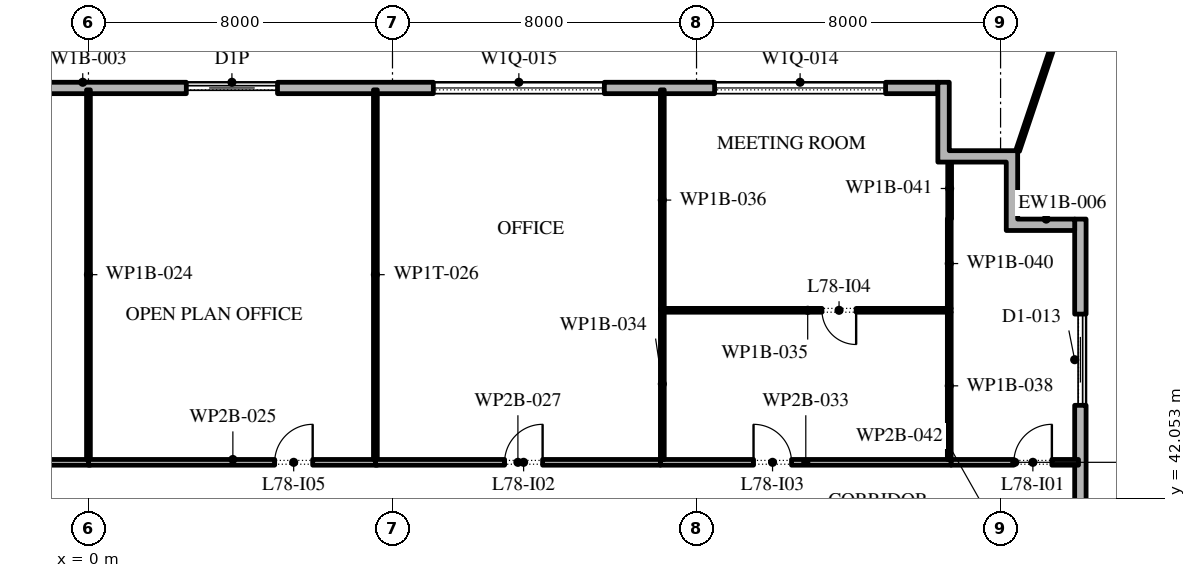
"""IFC4 building model, lengths in metres.
Left out: names, types, materials, properties, quantities, classifications, styles, units other than length and angle.
Written with IfcOpenShell. Run it as: python <this file> out.ifc"""

import sys

from ifc_helpers import new_model, si_unit, direction, frame, frame_2d, origin, place, context, subcontext, project, spatial, polyline, rectangle, outline, extrude, element, fill, save


model = new_model("IFC4")
c1 = context("Model", 3, precision=1e-05, world=origin(), true_north=direction((0.0, 1.0)))
c2 = subcontext(c1, "Body", "Model", "MODEL_VIEW")
j1 = project(units=[si_unit("LENGTHUNIT", "METRE"), si_unit("PLANEANGLEUNIT", "RADIAN")], contexts=[c1])
p1 = place(None, origin())
s1 = spatial("IfcSite", under=j1, at=p1, CompositionType="ELEMENT")
p2 = place(p1, origin())
s2 = spatial("IfcBuilding", under=s1, at=p2, CompositionType="ELEMENT")
p3 = place(p2, frame((0.0, 0.0, 355.2)))
s3 = spatial("IfcBuildingStorey", under=s2, at=p3, CompositionType="ELEMENT", Elevation=355.2)
p4 = place(p3, frame((26.1, -2.1, 0.0), z_axis=(0.0, 0.0, 1.0), x_axis=(0.0, 1.0, 0.0)))
e1 = element("IfcWall", 1, at=p4, inside=s3, PredefinedType="STANDARD", context=c2, shape_type="SweptSolid", body=[
    extrude(rectangle(XDim=51.5, YDim=0.3, at=frame_2d((25.75, 0.0))), origin(), (0.0, 0.0, 1.0), 3.95),
])
p5 = place(p4, frame((1.3, 0.0, 0.45)))
e2 = element("IfcOpeningElement", 2, at=p5, cuts=e1, PredefinedType="OPENING", context=c2, shape_type="SweptSolid", body=[
    extrude(rectangle(XDim=4.5, YDim=3.0, at=frame_2d((2.25, 1.5))), frame((0.0, 0.16, 0.0), z_axis=(0.0, -1.0, 0.0), x_axis=(1.0, 0.0, 0.0)), (0.0, 0.0, 1.0), 0.32),
])
p6 = place(p4, frame((8.55, 0.0, 0.45)))
e3 = element("IfcOpeningElement", 3, at=p6, cuts=e1, PredefinedType="OPENING", context=c2, shape_type="SweptSolid", body=[
    extrude(rectangle(XDim=4.5, YDim=3.0, at=frame_2d((2.25, 1.5))), frame((0.0, 0.16, 0.0), z_axis=(0.0, -1.0, 0.0), x_axis=(1.0, 0.0, 0.0)), (0.0, 0.0, 1.0), 0.32),
])
p7 = place(p4, frame((17.0, 0.0, 0.0)))
e4 = element("IfcOpeningElement", 4, at=p7, cuts=e1, PredefinedType="OPENING", context=c2, shape_type="SweptSolid", body=[
    extrude(rectangle(XDim=2.4, YDim=3.5, at=frame_2d((1.2, 1.75))), frame((0.0, 0.16, 0.0), z_axis=(0.0, -1.0, 0.0), x_axis=(1.0, 0.0, 0.0)), (0.0, 0.0, 1.0), 0.32),
])
p8 = place(p4, frame((23.35, 0.0, 0.45)))
e5 = element("IfcOpeningElement", 5, at=p8, cuts=e1, PredefinedType="OPENING", context=c2, shape_type="SweptSolid", body=[
    extrude(rectangle(XDim=4.5, YDim=3.05, at=frame_2d((2.25, 1.525))), frame((0.0, 0.16, 0.0), z_axis=(0.0, -1.0, 0.0), x_axis=(1.0, 0.0, 0.0)), (0.0, 0.0, 1.0), 0.32),
])
p9 = place(p4, frame((30.75, 0.0, 0.45)))
e6 = element("IfcOpeningElement", 6, at=p9, cuts=e1, PredefinedType="OPENING", context=c2, shape_type="SweptSolid", body=[
    extrude(rectangle(XDim=4.5, YDim=3.0, at=frame_2d((2.25, 1.5))), frame((0.0, 0.16, 0.0), z_axis=(0.0, -1.0, 0.0), x_axis=(1.0, 0.0, 0.0)), (0.0, 0.0, 1.0), 0.32),
])
p10 = place(p4, frame((38.15, 0.0, 0.45)))
e7 = element("IfcOpeningElement", 7, at=p10, cuts=e1, PredefinedType="OPENING", context=c2, shape_type="SweptSolid", body=[
    extrude(rectangle(XDim=4.5, YDim=3.05, at=frame_2d((2.25, 1.525))), frame((0.0, 0.16, 0.0), z_axis=(0.0, -1.0, 0.0), x_axis=(1.0, 0.0, 0.0)), (0.0, 0.0, 1.0), 0.32),
])
p11 = place(p4, frame((46.6, 0.0, 0.0)))
e8 = element("IfcOpeningElement", 8, at=p11, cuts=e1, PredefinedType="OPENING", context=c2, shape_type="SweptSolid", body=[
    extrude(rectangle(XDim=2.4, YDim=3.5, at=frame_2d((1.2, 1.75))), frame((0.0, 0.16, 0.0), z_axis=(0.0, -1.0, 0.0), x_axis=(1.0, 0.0, 0.0)), (0.0, 0.0, 1.0), 0.32),
])
p12 = place(p3, frame((22.35, 52.85, 0.0), z_axis=(0.0, 0.0, 1.0), x_axis=(-1.0, 0.0, 0.0)))
e9 = element("IfcWall", 9, at=p12, inside=s3, PredefinedType="STANDARD", context=c2, shape_type="SweptSolid", body=[
    extrude(rectangle(XDim=45.0, YDim=0.3, at=frame_2d((22.5, 0.0))), origin(), (0.0, 0.0, 1.0), 3.95),
])
p13 = place(p12, frame((1.375, 0.0, 0.45)))
e10 = element("IfcOpeningElement", 10, at=p13, cuts=e9, PredefinedType="OPENING", context=c2, shape_type="SweptSolid", body=[
    extrude(rectangle(XDim=4.5, YDim=2.45, at=frame_2d((2.25, 1.225))), frame((0.0, 0.16, 0.0), z_axis=(0.0, -1.0, 0.0), x_axis=(1.0, 0.0, 0.0)), (0.0, 0.0, 1.0), 0.32),
])
p14 = place(p12, frame((8.775, 0.0, 0.45)))
e11 = element("IfcOpeningElement", 11, at=p14, cuts=e9, PredefinedType="OPENING", context=c2, shape_type="SweptSolid", body=[
    extrude(rectangle(XDim=4.5, YDim=2.45, at=frame_2d((2.25, 1.225))), frame((0.0, 0.16, 0.0), z_axis=(0.0, -1.0, 0.0), x_axis=(1.0, 0.0, 0.0)), (0.0, 0.0, 1.0), 0.32),
])
p15 = place(p12, frame((17.375, 0.0, 0.0)))
e12 = element("IfcOpeningElement", 12, at=p15, cuts=e9, PredefinedType="OPENING", context=c2, shape_type="SweptSolid", body=[
    extrude(rectangle(XDim=2.4, YDim=2.9, at=frame_2d((1.2, 1.45))), frame((0.0, 0.16, 0.0), z_axis=(0.0, -1.0, 0.0), x_axis=(1.0, 0.0, 0.0)), (0.0, 0.0, 1.0), 0.32),
])
p16 = place(p12, frame((23.875, 0.0, 0.45)))
e13 = element("IfcOpeningElement", 13, at=p16, cuts=e9, PredefinedType="OPENING", context=c2, shape_type="SweptSolid", body=[
    extrude(rectangle(XDim=4.5, YDim=2.45, at=frame_2d((2.25, 1.225))), frame((0.0, 0.16, 0.0), z_axis=(0.0, -1.0, 0.0), x_axis=(1.0, 0.0, 0.0)), (0.0, 0.0, 1.0), 0.32),
])
p17 = place(p12, frame((31.425, 0.0, 0.45)))
e14 = element("IfcOpeningElement", 14, at=p17, cuts=e9, PredefinedType="OPENING", context=c2, shape_type="SweptSolid", body=[
    extrude(rectangle(XDim=4.5, YDim=2.45, at=frame_2d((2.25, 1.225))), frame((0.0, 0.16, 0.0), z_axis=(0.0, -1.0, 0.0), x_axis=(1.0, 0.0, 0.0)), (0.0, 0.0, 1.0), 0.32),
])
p18 = place(p12, frame((38.975, 0.0, 0.45)))
e15 = element("IfcOpeningElement", 15, at=p18, cuts=e9, PredefinedType="OPENING", context=c2, shape_type="SweptSolid", body=[
    extrude(rectangle(XDim=4.5, YDim=2.45, at=frame_2d((2.25, 1.225))), frame((0.0, 0.16, 0.0), z_axis=(0.0, -1.0, 0.0), x_axis=(1.0, 0.0, 0.0)), (0.0, 0.0, 1.0), 0.32),
])
p19 = place(p3, origin())
e16 = element("IfcWall", 16, at=p19, inside=s3, PredefinedType="STANDARD", context=c2, shape_type="SweptSolid", body=[
    extrude(outline(polyline([(24.15, 50.9), (22.35, 50.9), (22.35, 53.0), (22.65, 53.0), (22.65, 51.2), (24.45, 51.2), (24.45, 49.4), (25.95, 49.4), (25.95, 49.1), (24.15, 49.1), (24.15, 50.9)])), origin(), (0.0, 0.0, 1.0), 3.95),
])
p20 = place(p3, frame((24.45, 51.2, -0.05), z_axis=(0.0, 0.0, 1.0), x_axis=(0.318388488285, 0.947960321178, 0.0)))
e17 = element("IfcWall", 17, at=p20, inside=s3, PredefinedType="STANDARD", context=c2, shape_type="SweptSolid", body=[
    extrude(rectangle(XDim=6.811, YDim=0.1, at=frame_2d((3.405, 0.0))), origin(), (0.0, 0.0, 1.0), 4.0),
])
p21 = place(p3, frame((-7.55, 43.0, 0.0), z_axis=(0.0, 0.0, 1.0), x_axis=(1.0, 0.0, 0.0)))
e18 = element("IfcWall", 18, at=p21, inside=s3, PredefinedType="PARTITIONING", context=c2, shape_type="SweptSolid", body=[
    extrude(rectangle(XDim=7.6, YDim=0.15, at=frame_2d((3.8, 0.0))), origin(), (0.0, 0.0, 1.0), 3.95),
])
p22 = place(p21, frame((4.15, 0.0, 0.0)))
e19 = element("IfcOpeningElement", 19, at=p22, cuts=e18, PredefinedType="OPENING", context=c2, shape_type="SweptSolid", body=[
    extrude(rectangle(XDim=1.0, YDim=2.1, at=frame_2d((0.5, 1.05))), frame((0.0, 0.085, 0.0), z_axis=(0.0, -1.0, 0.0), x_axis=(1.0, 0.0, 0.0)), (0.0, 0.0, 1.0), 0.17),
])
p23 = place(p3, frame((0.0, 43.075, 0.0), z_axis=(0.0, 0.0, 1.0), x_axis=(0.0, 1.0, 0.0)))
e20 = element("IfcWall", 20, at=p23, inside=s3, PredefinedType="PARTITIONING", context=c2, shape_type="SweptSolid", body=[
    extrude(rectangle(XDim=9.725, YDim=0.1, at=frame_2d((4.863, 0.0))), origin(), (0.0, 0.0, 1.0), 3.95),
])
p24 = place(p3, frame((0.0, 43.0, 0.0), z_axis=(0.0, 0.0, 1.0), x_axis=(1.0, 0.0, 0.0)))
e21 = element("IfcWall", 21, at=p24, inside=s3, PredefinedType="PARTITIONING", context=c2, shape_type="SweptSolid", body=[
    extrude(rectangle(XDim=7.6, YDim=0.15, at=frame_2d((3.8, 0.0))), origin(), (0.0, 0.0, 1.0), 3.95),
])
p25 = place(p24, frame((4.9, 0.0, 0.0)))
e22 = element("IfcOpeningElement", 22, at=p25, cuts=e21, PredefinedType="OPENING", context=c2, shape_type="SweptSolid", body=[
    extrude(rectangle(XDim=1.0, YDim=2.1, at=frame_2d((0.5, 1.05))), frame((0.0, 0.085, 0.0), z_axis=(0.0, -1.0, 0.0), x_axis=(1.0, 0.0, 0.0)), (0.0, 0.0, 1.0), 0.17),
])
p26 = place(p3, frame((7.55, 43.075, 0.0), z_axis=(0.0, 0.0, 1.0), x_axis=(0.0, 1.0, 0.0)))
e23 = element("IfcWall", 23, at=p26, inside=s3, PredefinedType="PARTITIONING", context=c2, shape_type="SweptSolid", body=[
    extrude(rectangle(XDim=9.725, YDim=0.1, at=frame_2d((4.863, 0.0))), origin(), (0.0, 0.0, 1.0), 3.031),
])
p27 = place(p3, frame((7.55, 43.0, 0.0), z_axis=(0.0, 0.0, 1.0), x_axis=(1.0, 0.0, 0.0)))
e24 = element("IfcWall", 24, at=p27, inside=s3, PredefinedType="PARTITIONING", context=c2, shape_type="SweptSolid", body=[
    extrude(rectangle(XDim=7.5, YDim=0.15, at=frame_2d((3.75, 0.0))), origin(), (0.0, 0.0, 1.0), 3.95),
])
p28 = place(p27, frame((3.4, 0.0, 0.0)))
e25 = element("IfcOpeningElement", 25, at=p28, cuts=e24, PredefinedType="OPENING", context=c2, shape_type="SweptSolid", body=[
    extrude(rectangle(XDim=1.0, YDim=2.1, at=frame_2d((0.5, 1.05))), frame((0.0, 0.085, 0.0), z_axis=(0.0, -1.0, 0.0), x_axis=(1.0, 0.0, 0.0)), (0.0, 0.0, 1.0), 0.17),
])
p29 = place(p3, frame((15.05, 43.0, 0.0), z_axis=(0.0, 0.0, 1.0), x_axis=(1.0, 0.0, 0.0)))
e26 = element("IfcWall", 26, at=p29, inside=s3, PredefinedType="PARTITIONING", context=c2, shape_type="SweptSolid", body=[
    extrude(rectangle(XDim=7.65, YDim=0.15, at=frame_2d((3.825, 0.0))), origin(), (0.0, 0.0, 1.0), 3.95),
])
p30 = place(p29, frame((2.45, 0.0, 0.0)))
e27 = element("IfcOpeningElement", 27, at=p30, cuts=e26, PredefinedType="OPENING", context=c2, shape_type="SweptSolid", body=[
    extrude(rectangle(XDim=1.0, YDim=2.1, at=frame_2d((0.5, 1.05))), frame((0.0, 0.085, 0.0), z_axis=(0.0, -1.0, 0.0), x_axis=(1.0, 0.0, 0.0)), (0.0, 0.0, 1.0), 0.17),
])
p31 = place(p3, frame((15.1, 47.05, 0.0), z_axis=(0.0, 0.0, 1.0), x_axis=(0.0, -1.0, 0.0)))
e28 = element("IfcWall", 28, at=p31, inside=s3, PredefinedType="PARTITIONING", context=c2, shape_type="SweptSolid", body=[
    extrude(rectangle(XDim=3.975, YDim=0.1, at=frame_2d((1.988, 0.0))), origin(), (0.0, 0.0, 1.0), 3.95),
])
p32 = place(p3, frame((15.15, 47.0, 0.0), z_axis=(0.0, 0.0, 1.0), x_axis=(1.0, 0.0, 0.0)))
e29 = element("IfcWall", 29, at=p32, inside=s3, PredefinedType="PARTITIONING", context=c2, shape_type="SweptSolid", body=[
    extrude(rectangle(XDim=7.55, YDim=0.1, at=frame_2d((3.775, 0.0))), origin(), (0.0, 0.0, 1.0), 3.95),
])
p33 = place(p32, frame((4.15, 0.0, 0.0)))
e30 = element("IfcOpeningElement", 30, at=p33, cuts=e29, PredefinedType="OPENING", context=c2, shape_type="SweptSolid", body=[
    extrude(rectangle(XDim=0.9, YDim=2.1, at=frame_2d((0.45, 1.05))), frame((0.0, 0.06, 0.0), z_axis=(0.0, -1.0, 0.0), x_axis=(1.0, 0.0, 0.0)), (0.0, 0.0, 1.0), 0.12),
])
p34 = place(p3, frame((15.1, 52.8, 0.0), z_axis=(0.0, 0.0, 1.0), x_axis=(0.0, -1.0, 0.0)))
e31 = element("IfcWall", 31, at=p34, inside=s3, PredefinedType="PARTITIONING", context=c2, shape_type="SweptSolid", body=[
    extrude(rectangle(XDim=5.8, YDim=0.1, at=frame_2d((2.9, 0.0))), origin(), (0.0, 0.0, 1.0), 3.95),
])
p35 = place(p3, frame((22.65, 43.075, 0.0), z_axis=(0.0, 0.0, 1.0), x_axis=(0.0, 1.0, 0.0)))
e32 = element("IfcWall", 32, at=p35, inside=s3, PredefinedType="PARTITIONING", context=c2, shape_type="SweptSolid", body=[
    extrude(rectangle(XDim=3.875, YDim=0.1, at=frame_2d((1.938, 0.0))), origin(), (0.0, 0.0, 1.0), 3.95),
])
p36 = place(p3, frame((22.7, 43.0, 0.0), z_axis=(0.0, 0.0, 1.0), x_axis=(1.0, 0.0, 0.0)))
e33 = element("IfcWall", 33, at=p36, inside=s3, PredefinedType="PARTITIONING", context=c2, shape_type="SweptSolid", body=[
    extrude(rectangle(XDim=3.35, YDim=0.15, at=frame_2d((1.675, 0.0))), origin(), (0.0, 0.0, 1.0), 3.95),
])
p37 = place(p36, frame((1.65, 0.0, 0.0)))
e34 = element("IfcOpeningElement", 34, at=p37, cuts=e33, PredefinedType="OPENING", context=c2, shape_type="SweptSolid", body=[
    extrude(rectangle(XDim=1.0, YDim=2.1, at=frame_2d((0.5, 1.05))), frame((0.0, 0.085, 0.0), z_axis=(0.0, -1.0, 0.0), x_axis=(1.0, 0.0, 0.0)), (0.0, 0.0, 1.0), 0.17),
])
p38 = place(p3, frame((22.65, 47.05, 0.0), z_axis=(0.0, 0.0, 1.0), x_axis=(0.0, 1.0, 0.0)))
e35 = element("IfcWall", 35, at=p38, inside=s3, PredefinedType="PARTITIONING", context=c2, shape_type="SweptSolid", body=[
    extrude(rectangle(XDim=2.36, YDim=0.1, at=frame_2d((1.18, 0.0))), origin(), (0.0, 0.0, 1.0), 3.95),
])
p39 = place(p3, frame((22.66, 49.41, 0.0), z_axis=(0.0, 0.0, 1.0), x_axis=(0.0, 1.0, 0.0)))
e36 = element("IfcWall", 36, at=p39, inside=s3, PredefinedType="PARTITIONING", context=c2, shape_type="SweptSolid", body=[
    extrude(rectangle(XDim=1.59, YDim=0.1, at=frame_2d((0.795, 0.0))), origin(), (0.0, 0.0, 1.0), 3.95),
])
p40 = place(p11, origin())
e37 = element("IfcDoor", 37, at=p40, inside=s3, OperationType="DOUBLE_DOOR_SLIDING", PredefinedType="DOOR", context=c2, shape_type="SweptSolid", body=[
    extrude(rectangle(XDim=2.4, YDim=3.5, at=frame_2d((1.2, 1.75))), frame((0.0, 0.025, 0.0), z_axis=(0.0, -1.0, 0.0), x_axis=(1.0, 0.0, 0.0)), (0.0, 0.0, 1.0), 0.05),
])
fill(e8, e37)
p41 = place(p13, origin())
e38 = element("IfcWindow", 38, at=p41, inside=s3, PartitioningType="DOUBLE_PANEL_VERTICAL", PredefinedType="WINDOW", context=c2, shape_type="SweptSolid", body=[
    extrude(rectangle(XDim=4.5, YDim=2.45, at=frame_2d((2.25, 1.225))), frame((0.0, 0.03, 0.0), z_axis=(0.0, -1.0, 0.0), x_axis=(1.0, 0.0, 0.0)), (0.0, 0.0, 1.0), 0.06),
])
fill(e10, e38)
p42 = place(p14, origin())
e39 = element("IfcWindow", 39, at=p42, inside=s3, PartitioningType="DOUBLE_PANEL_VERTICAL", PredefinedType="WINDOW", context=c2, shape_type="SweptSolid", body=[
    extrude(rectangle(XDim=4.5, YDim=2.45, at=frame_2d((2.25, 1.225))), frame((0.0, 0.03, 0.0), z_axis=(0.0, -1.0, 0.0), x_axis=(1.0, 0.0, 0.0)), (0.0, 0.0, 1.0), 0.06),
])
fill(e11, e39)
p43 = place(p15, origin())
e40 = element("IfcDoor", 40, at=p43, inside=s3, OperationType="DOUBLE_DOOR_SLIDING", PredefinedType="DOOR", context=c2, shape_type="SweptSolid", body=[
    extrude(rectangle(XDim=2.4, YDim=2.9, at=frame_2d((1.2, 1.45))), frame((0.0, 0.025, 0.0), z_axis=(0.0, -1.0, 0.0), x_axis=(1.0, 0.0, 0.0)), (0.0, 0.0, 1.0), 0.05),
])
fill(e12, e40)
p44 = place(p37, origin())
e41 = element("IfcDoor", 41, at=p44, inside=s3, OperationType="SINGLE_SWING_LEFT", PredefinedType="DOOR", context=c2, shape_type="SweptSolid", body=[
    extrude(rectangle(XDim=1.0, YDim=2.1, at=frame_2d((0.5, 1.05))), frame((0.0, 0.025, 0.0), z_axis=(0.0, -1.0, 0.0), x_axis=(1.0, 0.0, 0.0)), (0.0, 0.0, 1.0), 0.05),
])
fill(e34, e41)
p45 = place(p28, origin())
e42 = element("IfcDoor", 42, at=p45, inside=s3, OperationType="SINGLE_SWING_LEFT", PredefinedType="DOOR", context=c2, shape_type="SweptSolid", body=[
    extrude(rectangle(XDim=1.0, YDim=2.1, at=frame_2d((0.5, 1.05))), frame((0.0, 0.025, 0.0), z_axis=(0.0, -1.0, 0.0), x_axis=(1.0, 0.0, 0.0)), (0.0, 0.0, 1.0), 0.05),
])
fill(e25, e42)
p46 = place(p30, origin())
e43 = element("IfcDoor", 43, at=p46, inside=s3, OperationType="SINGLE_SWING_RIGHT", PredefinedType="DOOR", context=c2, shape_type="SweptSolid", body=[
    extrude(rectangle(XDim=1.0, YDim=2.1, at=frame_2d((0.5, 1.05))), frame((0.0, 0.025, 0.0), z_axis=(0.0, -1.0, 0.0), x_axis=(1.0, 0.0, 0.0)), (0.0, 0.0, 1.0), 0.05),
])
fill(e27, e43)
p47 = place(p33, frame((0.9, 0.0, 0.0), z_axis=(0.0, 0.0, 1.0), x_axis=(-1.0, 0.0, 0.0)))
e44 = element("IfcDoor", 44, at=p47, inside=s3, OperationType="SINGLE_SWING_RIGHT", PredefinedType="DOOR", context=c2, shape_type="SweptSolid", body=[
    extrude(rectangle(XDim=0.9, YDim=2.1, at=frame_2d((0.45, 1.05))), frame((0.0, 0.025, 0.0), z_axis=(0.0, -1.0, 0.0), x_axis=(1.0, 0.0, 0.0)), (0.0, 0.0, 1.0), 0.05),
])
fill(e30, e44)
p48 = place(p25, origin())
e45 = element("IfcDoor", 45, at=p48, inside=s3, OperationType="SINGLE_SWING_LEFT", PredefinedType="DOOR", context=c2, shape_type="SweptSolid", body=[
    extrude(rectangle(XDim=1.0, YDim=2.1, at=frame_2d((0.5, 1.05))), frame((0.0, 0.025, 0.0), z_axis=(0.0, -1.0, 0.0), x_axis=(1.0, 0.0, 0.0)), (0.0, 0.0, 1.0), 0.05),
])
fill(e22, e45)
save(model, sys.argv[1])
